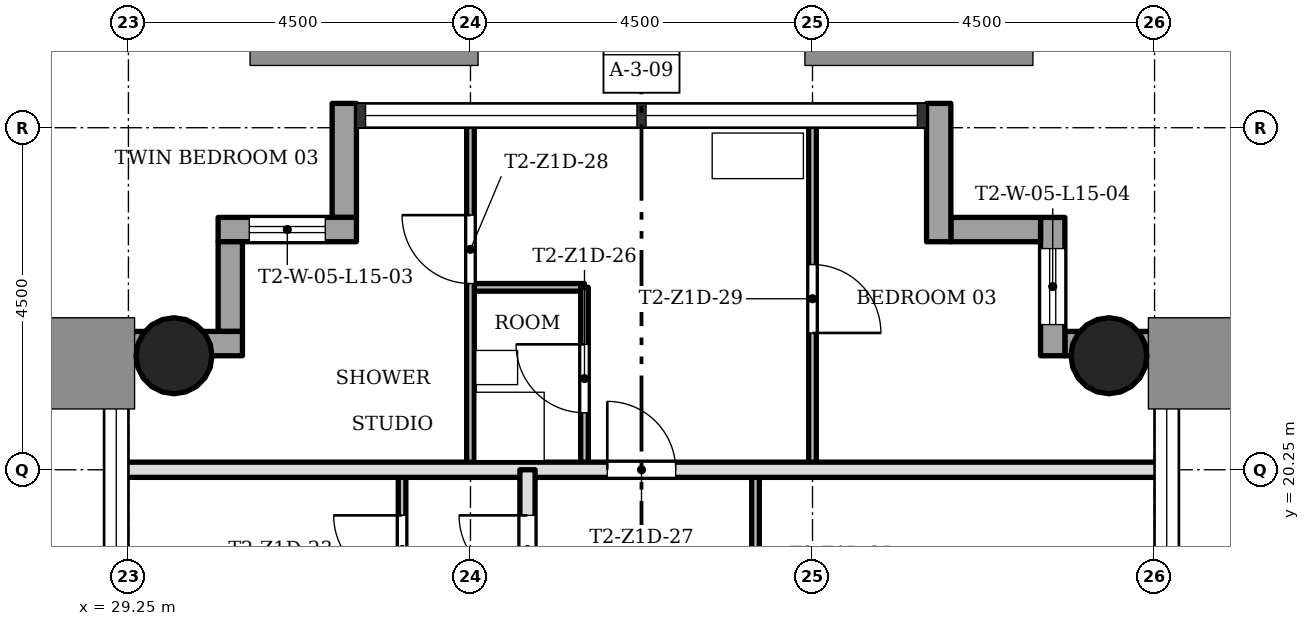
"""IFC4 building model, lengths in metres.
Left out: names, types, materials, properties, quantities, classifications, styles, units other than length and angle.
Written with IfcOpenShell. Run it as: python <this file> out.ifc"""

import sys

from ifc_helpers import new_model, si_unit, direction, frame, frame_2d, origin, origin_2d, place, context, subcontext, project, spatial, rectangle, hollow_circle, extrude, element, fill, save


model = new_model("IFC4")
c1 = context("Model", 3, precision=1e-05, world=origin(), true_north=direction((0.0, 1.0)))
c2 = subcontext(c1, "Body", "Model", "MODEL_VIEW")
j1 = project(units=[si_unit("LENGTHUNIT", "METRE"), si_unit("PLANEANGLEUNIT", "RADIAN")], contexts=[c1])
p1 = place(None, origin())
s1 = spatial("IfcSite", under=j1, at=p1, CompositionType="ELEMENT")
p2 = place(p1, origin())
s2 = spatial("IfcBuilding", under=s1, at=p2, CompositionType="ELEMENT")
p3 = place(p2, frame((0.0, 0.0, 58.5)))
s3 = spatial("IfcBuildingStorey", under=s2, at=p3, CompositionType="ELEMENT", Elevation=58.5)
for number, where, z_axis, x_axis in (
    (1, (42.15, 21.75, 0.0), (0.0, 0.0, 1.0), (1.0, 0.0, 0.0)),
    (2, (29.85, 21.75, 0.0), (0.0, 0.0, 1.0), (1.0, 0.0, 0.0)),
):
    element("IfcColumn", number, at=place(p3, frame(where, z_axis=z_axis, x_axis=x_axis)), inside=s3, PredefinedType="COLUMN", context=c2, shape_type="SweptSolid", body=[
        extrude(hollow_circle(Radius=0.5, WallThickness=0.036, at=origin_2d()), origin(), (0.0, 0.0, 1.0), 3.4),
    ])
p4 = place(p3, frame((43.07, 21.91, -0.3), z_axis=(0.0, 0.0, 1.0), x_axis=(-1.0, 0.0, 0.0)))
e3 = element("IfcWall", 3, at=p4, inside=s3, PredefinedType="STANDARD", context=c2, shape_type="SweptSolid", body=[
    extrude(rectangle(XDim=1.5, YDim=0.32, at=frame_2d((0.75, 0.0))), origin(), (0.0, 0.0, 1.0), 3.4),
])
p5 = place(p3, frame((41.41, 21.75, -0.3), z_axis=(0.0, 0.0, 1.0), x_axis=(0.0, 1.0, 0.0)))
e4 = element("IfcWall", 4, at=p5, inside=s3, PredefinedType="STANDARD", context=c2, shape_type="SweptSolid", body=[
    extrude(rectangle(XDim=1.82, YDim=0.32, at=frame_2d((0.91, 0.0))), origin(), (0.0, 0.0, 1.0), 3.4),
])
p6 = place(p5, frame((0.41, 0.0, 1.2)))
e5 = element("IfcOpeningElement", 5, at=p6, cuts=e4, PredefinedType="OPENING", context=c2, shape_type="SweptSolid", body=[
    extrude(rectangle(XDim=1.0, YDim=1.5, at=frame_2d((0.5, 0.75))), frame((0.0, 0.17, 0.0), z_axis=(0.0, -1.0, 0.0), x_axis=(1.0, 0.0, 0.0)), (0.0, 0.0, 1.0), 0.34),
])
p7 = place(p3, frame((41.25, 23.41, -0.3), z_axis=(0.0, 0.0, 1.0), x_axis=(-1.0, 0.0, 0.0)))
e6 = element("IfcWall", 6, at=p7, inside=s3, PredefinedType="STANDARD", context=c2, shape_type="SweptSolid", body=[
    extrude(rectangle(XDim=1.18, YDim=0.32, at=frame_2d((0.59, 0.0))), origin(), (0.0, 0.0, 1.0), 3.4),
])
p8 = place(p3, frame((39.91, 23.25, -0.3), z_axis=(0.0, 0.0, 1.0), x_axis=(0.0, 1.0, 0.0)))
e7 = element("IfcWall", 7, at=p8, inside=s3, PredefinedType="STANDARD", context=c2, shape_type="SweptSolid", body=[
    extrude(rectangle(XDim=1.82, YDim=0.32, at=frame_2d((0.91, 0.0))), origin(), (0.0, 0.0, 1.0), 3.4),
])
p9 = place(p3, frame((32.09, 25.07, -0.3), z_axis=(0.0, 0.0, 1.0), x_axis=(0.0, -1.0, 0.0)))
e8 = element("IfcWall", 8, at=p9, inside=s3, PredefinedType="STANDARD", context=c2, shape_type="SweptSolid", body=[
    extrude(rectangle(XDim=1.5, YDim=0.32, at=frame_2d((0.75, 0.0))), origin(), (0.0, 0.0, 1.0), 3.4),
])
p10 = place(p3, frame((32.25, 23.41, -0.3), z_axis=(0.0, 0.0, 1.0), x_axis=(-1.0, 0.0, 0.0)))
e9 = element("IfcWall", 9, at=p10, inside=s3, PredefinedType="STANDARD", context=c2, shape_type="SweptSolid", body=[
    extrude(rectangle(XDim=1.82, YDim=0.32, at=frame_2d((0.91, 0.0))), origin(), (0.0, 0.0, 1.0), 3.4),
])
p11 = place(p10, frame((0.41, 0.0, 1.2)))
e10 = element("IfcOpeningElement", 10, at=p11, cuts=e9, PredefinedType="OPENING", context=c2, shape_type="SweptSolid", body=[
    extrude(rectangle(XDim=1.0, YDim=1.5, at=frame_2d((0.5, 0.75))), frame((0.0, 0.17, 0.0), z_axis=(0.0, -1.0, 0.0), x_axis=(1.0, 0.0, 0.0)), (0.0, 0.0, 1.0), 0.34),
])
p12 = place(p3, frame((30.59, 23.25, -0.3), z_axis=(0.0, 0.0, 1.0), x_axis=(0.0, -1.0, 0.0)))
e11 = element("IfcWall", 11, at=p12, inside=s3, PredefinedType="STANDARD", context=c2, shape_type="SweptSolid", body=[
    extrude(rectangle(XDim=1.18, YDim=0.32, at=frame_2d((0.59, 0.0))), origin(), (0.0, 0.0, 1.0), 3.4),
])
p13 = place(p3, frame((30.75, 21.91, -0.3), z_axis=(0.0, 0.0, 1.0), x_axis=(-1.0, 0.0, 0.0)))
e12 = element("IfcWall", 12, at=p13, inside=s3, PredefinedType="STANDARD", context=c2, shape_type="SweptSolid", body=[
    extrude(rectangle(XDim=1.82, YDim=0.32, at=frame_2d((0.91, 0.0))), origin(), (0.0, 0.0, 1.0), 3.4),
])
p14 = place(p3, frame((42.85, 20.25, 0.0), z_axis=(0.0, 0.0, 1.0), x_axis=(-1.0, 0.0, 0.0)))
e13 = element("IfcWall", 13, at=p14, inside=s3, PredefinedType="SOLIDWALL", context=c2, shape_type="SweptSolid", body=[
    extrude(rectangle(XDim=13.7, YDim=0.2, at=frame_2d((6.85, 0.0))), origin(), (0.0, 0.0, 1.0), 3.0),
])
p15 = place(p14, frame((6.4, 0.0, 0.0)))
e14 = element("IfcOpeningElement", 14, at=p15, cuts=e13, PredefinedType="OPENING", context=c2, shape_type="SweptSolid", body=[
    extrude(rectangle(XDim=0.9, YDim=2.1, at=frame_2d((0.45, 1.05))), frame((0.0, 0.11, 0.0), z_axis=(0.0, -1.0, 0.0), x_axis=(1.0, 0.0, 0.0)), (0.0, 0.0, 1.0), 0.22),
])
p16 = place(p3, frame((35.25, 22.65, 0.0), z_axis=(0.0, 0.0, 1.0), x_axis=(-1.0, 0.0, 0.0)))
e15 = element("IfcWall", 15, at=p16, inside=s3, PredefinedType="PARTITIONING", context=c2, shape_type="SweptSolid", body=[
    extrude(rectangle(XDim=1.5, YDim=0.1, at=frame_2d((0.75, 0.0))), origin(), (0.0, 0.0, 1.0), 3.0),
])
p17 = place(p3, frame((38.25, 20.25, 0.0), z_axis=(0.0, 0.0, 1.0), x_axis=(0.0, 1.0, 0.0)))
e16 = element("IfcWall", 16, at=p17, inside=s3, PredefinedType="PARTITIONING", context=c2, shape_type="SweptSolid", body=[
    extrude(rectangle(XDim=4.6, YDim=0.1, at=frame_2d((2.3, 0.0))), origin(), (0.0, 0.0, 1.0), 3.0),
])
p18 = place(p17, frame((1.8, 0.0, 0.0)))
e17 = element("IfcOpeningElement", 17, at=p18, cuts=e16, PredefinedType="OPENING", context=c2, shape_type="SweptSolid", body=[
    extrude(rectangle(XDim=0.9, YDim=2.1, at=frame_2d((0.45, 1.05))), frame((0.0, 0.06, 0.0), z_axis=(0.0, -1.0, 0.0), x_axis=(1.0, 0.0, 0.0)), (0.0, 0.0, 1.0), 0.12),
])
p19 = place(p3, frame((37.5, 15.75, 0.0), z_axis=(0.0, 0.0, 1.0), x_axis=(0.0, 1.0, 0.0)))
e18 = element("IfcWall", 18, at=p19, inside=s3, PredefinedType="PARTITIONING", context=c2, shape_type="SweptSolid", body=[
    extrude(rectangle(XDim=4.5, YDim=0.1, at=frame_2d((2.25, 0.0))), origin(), (0.0, 0.0, 1.0), 3.0),
])
p20 = place(p19, frame((1.8, 0.0, 0.0)))
e19 = element("IfcOpeningElement", 19, at=p20, cuts=e18, PredefinedType="OPENING", context=c2, shape_type="SweptSolid", body=[
    extrude(rectangle(XDim=0.9, YDim=2.1, at=frame_2d((0.45, 1.05))), frame((0.0, 0.06, 0.0), z_axis=(0.0, -1.0, 0.0), x_axis=(1.0, 0.0, 0.0)), (0.0, 0.0, 1.0), 0.12),
])
p21 = place(p3, frame((35.25, 20.25, 0.0), z_axis=(0.0, 0.0, 1.0), x_axis=(0.0, 1.0, 0.0)))
e20 = element("IfcWall", 20, at=p21, inside=s3, PredefinedType="PARTITIONING", context=c2, shape_type="SweptSolid", body=[
    extrude(rectangle(XDim=2.4, YDim=0.1, at=frame_2d((1.2, 0.0))), origin(), (0.0, 0.0, 1.0), 3.0),
])
p22 = place(p21, frame((0.75, 0.0, 0.0)))
e21 = element("IfcOpeningElement", 21, at=p22, cuts=e20, PredefinedType="OPENING", context=c2, shape_type="SweptSolid", body=[
    extrude(rectangle(XDim=0.9, YDim=2.1, at=frame_2d((0.45, 1.05))), frame((0.0, 0.06, 0.0), z_axis=(0.0, -1.0, 0.0), x_axis=(1.0, 0.0, 0.0)), (0.0, 0.0, 1.0), 0.12),
])
p23 = place(p3, frame((34.5, 15.75, 0.0), z_axis=(0.0, 0.0, 1.0), x_axis=(0.0, 1.0, 0.0)))
e22 = element("IfcWall", 22, at=p23, inside=s3, PredefinedType="SOLIDWALL", context=c2, shape_type="SweptSolid", body=[
    extrude(rectangle(XDim=4.5, YDim=0.2, at=frame_2d((2.25, 0.0))), origin(), (0.0, 0.0, 1.0), 3.0),
])
p24 = place(p23, frame((3.0, 0.0, 0.0)))
e23 = element("IfcOpeningElement", 23, at=p24, cuts=e22, PredefinedType="OPENING", context=c2, shape_type="SweptSolid", body=[
    extrude(rectangle(XDim=0.9, YDim=2.1, at=frame_2d((0.45, 1.05))), frame((0.0, 0.11, 0.0), z_axis=(0.0, -1.0, 0.0), x_axis=(1.0, 0.0, 0.0)), (0.0, 0.0, 1.0), 0.22),
])
p25 = place(p3, frame((33.75, 20.25, 0.0), z_axis=(0.0, 0.0, 1.0), x_axis=(0.0, 1.0, 0.0)))
e24 = element("IfcWall", 24, at=p25, inside=s3, PredefinedType="PARTITIONING", context=c2, shape_type="SweptSolid", body=[
    extrude(rectangle(XDim=4.6, YDim=0.1, at=frame_2d((2.3, 0.0))), origin(), (0.0, 0.0, 1.0), 3.0),
])
p26 = place(p25, frame((2.45, 0.0, 0.0)))
e25 = element("IfcOpeningElement", 25, at=p26, cuts=e24, PredefinedType="OPENING", context=c2, shape_type="SweptSolid", body=[
    extrude(rectangle(XDim=0.9, YDim=2.1, at=frame_2d((0.45, 1.05))), frame((0.0, 0.06, 0.0), z_axis=(0.0, -1.0, 0.0), x_axis=(1.0, 0.0, 0.0)), (0.0, 0.0, 1.0), 0.12),
])
p27 = place(p3, frame((32.85, 15.75, 0.0), z_axis=(0.0, 0.0, 1.0), x_axis=(0.0, 1.0, 0.0)))
e26 = element("IfcWall", 26, at=p27, inside=s3, PredefinedType="PARTITIONING", context=c2, shape_type="SweptSolid", body=[
    extrude(rectangle(XDim=4.5, YDim=0.1, at=frame_2d((2.25, 0.0))), origin(), (0.0, 0.0, 1.0), 3.0),
])
p28 = place(p27, frame((3.0, 0.0, 0.0)))
e27 = element("IfcOpeningElement", 27, at=p28, cuts=e26, PredefinedType="OPENING", context=c2, shape_type="SweptSolid", body=[
    extrude(rectangle(XDim=0.9, YDim=2.1, at=frame_2d((0.45, 1.05))), frame((0.0, 0.06, 0.0), z_axis=(0.0, -1.0, 0.0), x_axis=(1.0, 0.0, 0.0)), (0.0, 0.0, 1.0), 0.12),
])
p29 = place(p24, origin())
e28 = element("IfcDoor", 28, at=p29, inside=s3, OperationType="SINGLE_SWING_LEFT", PredefinedType="DOOR", context=c2, shape_type="SweptSolid", body=[
    extrude(rectangle(XDim=0.9, YDim=2.1, at=frame_2d((0.45, 1.05))), frame((0.0, 0.025, 0.0), z_axis=(0.0, -1.0, 0.0), x_axis=(1.0, 0.0, 0.0)), (0.0, 0.0, 1.0), 0.05),
])
fill(e23, e28)
p30 = place(p28, origin())
e29 = element("IfcDoor", 29, at=p30, inside=s3, OperationType="SINGLE_SWING_LEFT", PredefinedType="DOOR", context=c2, shape_type="SweptSolid", body=[
    extrude(rectangle(XDim=0.9, YDim=2.1, at=frame_2d((0.45, 1.05))), frame((0.0, 0.025, 0.0), z_axis=(0.0, -1.0, 0.0), x_axis=(1.0, 0.0, 0.0)), (0.0, 0.0, 1.0), 0.05),
])
fill(e27, e29)
p31 = place(p22, origin())
e30 = element("IfcDoor", 30, at=p31, inside=s3, OperationType="SINGLE_SWING_LEFT", PredefinedType="DOOR", context=c2, shape_type="SweptSolid", body=[
    extrude(rectangle(XDim=0.9, YDim=2.1, at=frame_2d((0.45, 1.05))), frame((0.0, 0.025, 0.0), z_axis=(0.0, -1.0, 0.0), x_axis=(1.0, 0.0, 0.0)), (0.0, 0.0, 1.0), 0.05),
])
fill(e21, e30)
p32 = place(p15, origin())
e31 = element("IfcDoor", 31, at=p32, inside=s3, OperationType="SINGLE_SWING_RIGHT", PredefinedType="DOOR", context=c2, shape_type="SweptSolid", body=[
    extrude(rectangle(XDim=0.9, YDim=2.1, at=frame_2d((0.45, 1.05))), frame((0.0, 0.025, 0.0), z_axis=(0.0, -1.0, 0.0), x_axis=(1.0, 0.0, 0.0)), (0.0, 0.0, 1.0), 0.05),
])
fill(e14, e31)
p33 = place(p26, origin())
e32 = element("IfcDoor", 32, at=p33, inside=s3, OperationType="SINGLE_SWING_LEFT", PredefinedType="DOOR", context=c2, shape_type="SweptSolid", body=[
    extrude(rectangle(XDim=0.9, YDim=2.1, at=frame_2d((0.45, 1.05))), frame((0.0, 0.025, 0.0), z_axis=(0.0, -1.0, 0.0), x_axis=(1.0, 0.0, 0.0)), (0.0, 0.0, 1.0), 0.05),
])
fill(e25, e32)
p34 = place(p18, origin())
e33 = element("IfcDoor", 33, at=p34, inside=s3, OperationType="SINGLE_SWING_LEFT", PredefinedType="DOOR", context=c2, shape_type="SweptSolid", body=[
    extrude(rectangle(XDim=0.9, YDim=2.1, at=frame_2d((0.45, 1.05))), frame((0.0, 0.025, 0.0), z_axis=(0.0, -1.0, 0.0), x_axis=(1.0, 0.0, 0.0)), (0.0, 0.0, 1.0), 0.05),
])
fill(e17, e33)
p35 = place(p11, origin())
e34 = element("IfcWindow", 34, at=p35, inside=s3, PartitioningType="SINGLE_PANEL", PredefinedType="WINDOW", context=c2, shape_type="SweptSolid", body=[
    extrude(rectangle(XDim=1.0, YDim=1.5, at=frame_2d((0.5, 0.75))), frame((0.0, 0.03, 0.0), z_axis=(0.0, -1.0, 0.0), x_axis=(1.0, 0.0, 0.0)), (0.0, 0.0, 1.0), 0.06),
])
fill(e10, e34)
p36 = place(p6, origin())
e35 = element("IfcWindow", 35, at=p36, inside=s3, PartitioningType="SINGLE_PANEL", PredefinedType="WINDOW", context=c2, shape_type="SweptSolid", body=[
    extrude(rectangle(XDim=1.0, YDim=1.5, at=frame_2d((0.5, 0.75))), frame((0.0, 0.03, 0.0), z_axis=(0.0, -1.0, 0.0), x_axis=(1.0, 0.0, 0.0)), (0.0, 0.0, 1.0), 0.06),
])
fill(e5, e35)
save(model, sys.argv[1])
